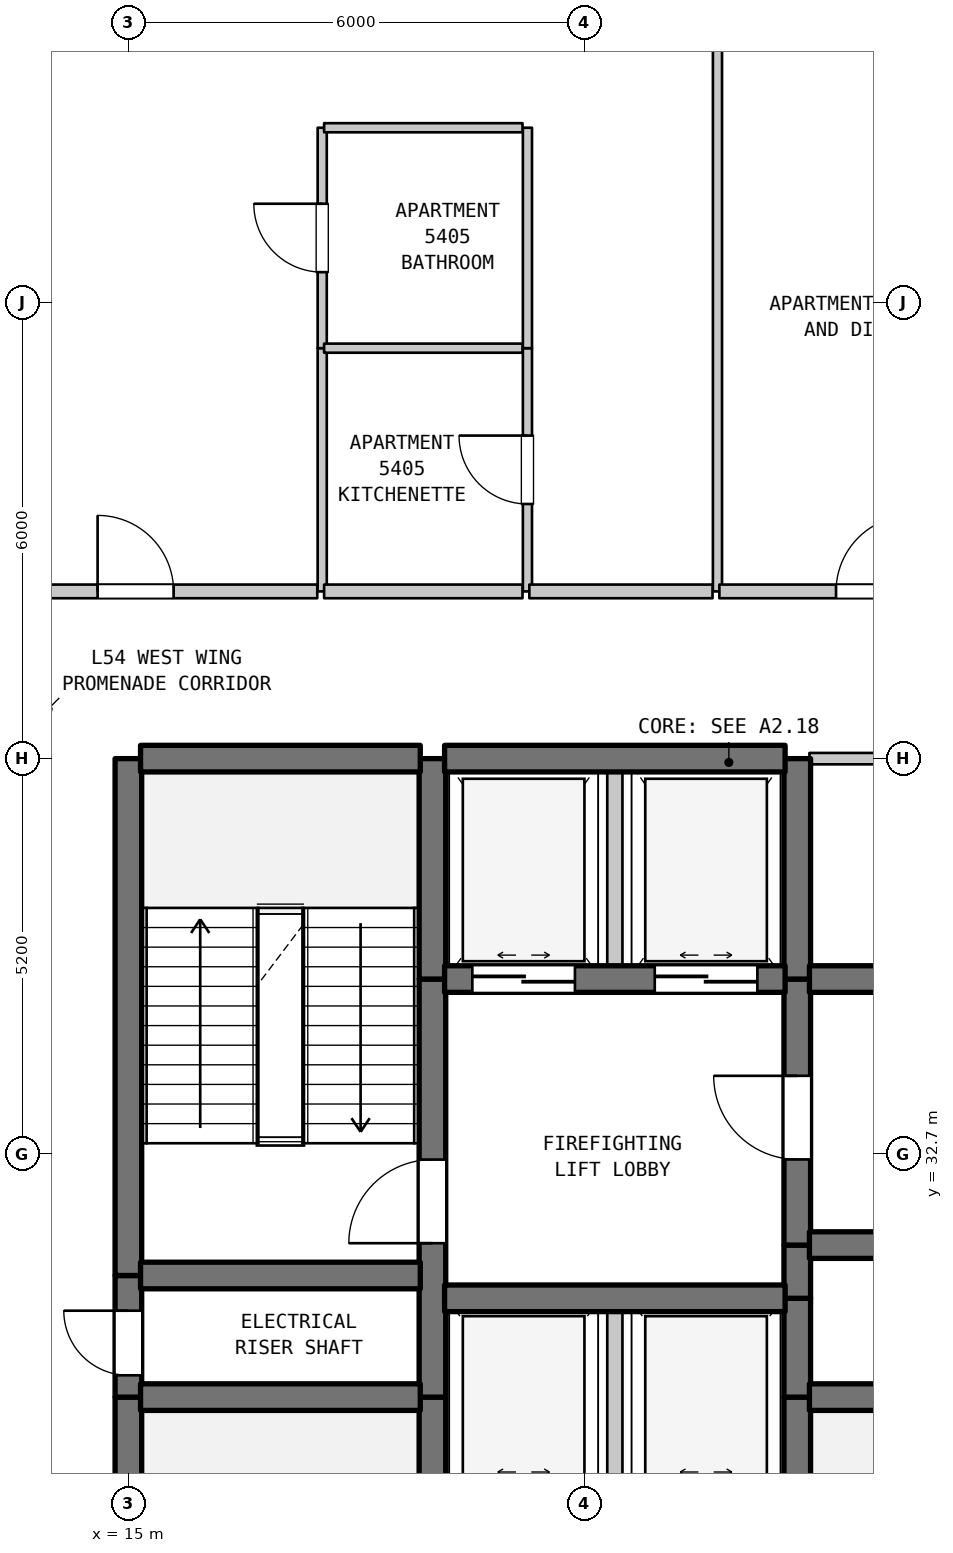
"""IFC4 building model, lengths in metres.
Left out: names, types, materials, properties, quantities, classifications, styles, units other than length and angle.
Written with IfcOpenShell. Run it as: python <this file> out.ifc"""

import sys

from ifc_helpers import new_model, si_unit, direction, frame, frame_2d, origin, place, context, subcontext, project, spatial, rectangle, extrude, element, fill, save


model = new_model("IFC4")
c1 = context("Model", 3, precision=1e-05, world=origin(), true_north=direction((0.0, 1.0)))
c2 = subcontext(c1, "Body", "Model", "MODEL_VIEW")
j1 = project(units=[si_unit("LENGTHUNIT", "METRE"), si_unit("PLANEANGLEUNIT", "RADIAN")], contexts=[c1])
p1 = place(None, origin())
s1 = spatial("IfcSite", under=j1, at=p1, CompositionType="ELEMENT")
p2 = place(p1, origin())
s2 = spatial("IfcBuilding", under=s1, at=p2, CompositionType="ELEMENT")
p3 = place(p2, frame((0.0, 0.0, 218.0)))
s3 = spatial("IfcBuildingStorey", under=s2, at=p3, CompositionType="ELEMENT", Elevation=218.0)
p4 = place(p3, frame((15.0, 22.7, 0.0), z_axis=(0.0, 0.0, 1.0), x_axis=(0.0, 1.0, 0.0)))
e1 = element("IfcWall", 1, at=p4, inside=s3, PredefinedType="SHEAR", context=c2, shape_type="SweptSolid", body=[
    extrude(rectangle(XDim=6.8, YDim=0.35, at=frame_2d((3.4, 0.0))), origin(), (0.0, 0.0, 1.0), 4.49),
])
p5 = place(p3, frame((15.0, 29.5, 0.0), z_axis=(0.0, 0.0, 1.0), x_axis=(0.0, 1.0, 0.0)))
e2 = element("IfcWall", 2, at=p5, inside=s3, PredefinedType="SHEAR", context=c2, shape_type="SweptSolid", body=[
    extrude(rectangle(XDim=1.6, YDim=0.35, at=frame_2d((0.8, 0.0))), origin(), (0.0, 0.0, 1.0), 4.49),
])
p6 = place(p5, frame((0.287, 0.0, 0.0)))
e3 = element("IfcOpeningElement", 3, at=p6, cuts=e2, PredefinedType="OPENING", context=c2, shape_type="SweptSolid", body=[
    extrude(rectangle(XDim=0.85, YDim=2.1, at=frame_2d((0.425, 1.05))), frame((0.0, 0.185, 0.0), z_axis=(0.0, -1.0, 0.0), x_axis=(1.0, 0.0, 0.0)), (0.0, 0.0, 1.0), 0.37),
])
p7 = place(p3, frame((15.0, 31.1, 0.0), z_axis=(0.0, 0.0, 1.0), x_axis=(0.0, 1.0, 0.0)))
e4 = element("IfcWall", 4, at=p7, inside=s3, PredefinedType="SHEAR", context=c2, shape_type="SweptSolid", body=[
    extrude(rectangle(XDim=6.8, YDim=0.35, at=frame_2d((3.4, 0.0))), origin(), (0.0, 0.0, 1.0), 4.49),
])
p8 = place(p3, frame((17.55, 40.1, 0.0), z_axis=(0.0, 0.0, 1.0), x_axis=(0.0, 1.0, 0.0)))
e5 = element("IfcWall", 5, at=p8, inside=s3, PredefinedType="PARTITIONING", context=c2, shape_type="SweptSolid", body=[
    extrude(rectangle(XDim=3.2, YDim=0.12, at=frame_2d((1.6, 0.0))), origin(), (0.0, 0.0, 1.0), 4.49),
])
p9 = place(p3, frame((17.55, 43.3, 0.0), z_axis=(0.0, 0.0, 1.0), x_axis=(0.0, 1.0, 0.0)))
e6 = element("IfcWall", 6, at=p9, inside=s3, PredefinedType="PARTITIONING", context=c2, shape_type="SweptSolid", body=[
    extrude(rectangle(XDim=2.9, YDim=0.12, at=frame_2d((1.45, 0.0))), origin(), (0.0, 0.0, 1.0), 4.49),
])
p10 = place(p9, frame((1.0, 0.0, 0.0)))
e7 = element("IfcOpeningElement", 7, at=p10, cuts=e6, PredefinedType="OPENING", context=c2, shape_type="SweptSolid", body=[
    extrude(rectangle(XDim=0.9, YDim=2.1, at=frame_2d((0.45, 1.05))), frame((0.0, 0.07, 0.0), z_axis=(0.0, -1.0, 0.0), x_axis=(1.0, 0.0, 0.0)), (0.0, 0.0, 1.0), 0.14),
])
p11 = place(p3, frame((19.0, 28.2, 0.0), z_axis=(0.0, 0.0, 1.0), x_axis=(0.0, 1.0, 0.0)))
e8 = element("IfcWall", 8, at=p11, inside=s3, PredefinedType="SHEAR", context=c2, shape_type="SweptSolid", body=[
    extrude(rectangle(XDim=1.3, YDim=0.35, at=frame_2d((0.65, 0.0))), origin(), (0.0, 0.0, 1.0), 4.49),
])
p12 = place(p3, frame((19.0, 29.5, 0.0), z_axis=(0.0, 0.0, 1.0), x_axis=(0.0, 1.0, 0.0)))
e9 = element("IfcWall", 9, at=p12, inside=s3, PredefinedType="SHEAR", context=c2, shape_type="SweptSolid", body=[
    extrude(rectangle(XDim=5.5, YDim=0.35, at=frame_2d((2.75, 0.0))), origin(), (0.0, 0.0, 1.0), 4.49),
])
p13 = place(p12, frame((2.025, 0.0, 0.0)))
e10 = element("IfcOpeningElement", 10, at=p13, cuts=e9, PredefinedType="OPENING", context=c2, shape_type="SweptSolid", body=[
    extrude(rectangle(XDim=1.1, YDim=2.15, at=frame_2d((0.55, 1.075))), frame((0.0, 0.185, 0.0), z_axis=(0.0, -1.0, 0.0), x_axis=(1.0, 0.0, 0.0)), (0.0, 0.0, 1.0), 0.37),
])
p14 = place(p3, frame((19.0, 35.0, 0.0), z_axis=(0.0, 0.0, 1.0), x_axis=(0.0, 1.0, 0.0)))
e11 = element("IfcWall", 11, at=p14, inside=s3, PredefinedType="SHEAR", context=c2, shape_type="SweptSolid", body=[
    extrude(rectangle(XDim=2.9, YDim=0.35, at=frame_2d((1.45, 0.0))), origin(), (0.0, 0.0, 1.0), 4.49),
])
p15 = place(p3, frame((20.25, 40.1, 0.0), z_axis=(0.0, 0.0, 1.0), x_axis=(0.0, 1.0, 0.0)))
e12 = element("IfcWall", 12, at=p15, inside=s3, PredefinedType="PARTITIONING", context=c2, shape_type="SweptSolid", body=[
    extrude(rectangle(XDim=3.2, YDim=0.12, at=frame_2d((1.6, 0.0))), origin(), (0.0, 0.0, 1.0), 4.49),
])
p16 = place(p15, frame((1.15, 0.0, 0.0)))
e13 = element("IfcOpeningElement", 13, at=p16, cuts=e12, PredefinedType="OPENING", context=c2, shape_type="SweptSolid", body=[
    extrude(rectangle(XDim=0.9, YDim=2.15, at=frame_2d((0.45, 1.075))), frame((0.0, 0.07, 0.0), z_axis=(0.0, -1.0, 0.0), x_axis=(1.0, 0.0, 0.0)), (0.0, 0.0, 1.0), 0.14),
])
p17 = place(p3, frame((20.25, 43.3, 0.0), z_axis=(0.0, 0.0, 1.0), x_axis=(0.0, 1.0, 0.0)))
e14 = element("IfcWall", 14, at=p17, inside=s3, PredefinedType="PARTITIONING", context=c2, shape_type="SweptSolid", body=[
    extrude(rectangle(XDim=2.9, YDim=0.12, at=frame_2d((1.45, 0.0))), origin(), (0.0, 0.0, 1.0), 4.49),
])
p18 = place(p3, frame((21.4, 28.2, 0.0), z_axis=(0.0, 0.0, 1.0), x_axis=(0.0, 1.0, 0.0)))
e15 = element("IfcWall", 15, at=p18, inside=s3, PredefinedType="STANDARD", context=c2, shape_type="SweptSolid", body=[
    extrude(rectangle(XDim=2.6, YDim=0.2, at=frame_2d((1.3, 0.0))), origin(), (0.0, 0.0, 1.0), 4.49),
])
p19 = place(p3, frame((21.4, 35.0, 0.0), z_axis=(0.0, 0.0, 1.0), x_axis=(0.0, 1.0, 0.0)))
e16 = element("IfcWall", 16, at=p19, inside=s3, PredefinedType="STANDARD", context=c2, shape_type="SweptSolid", body=[
    extrude(rectangle(XDim=2.9, YDim=0.2, at=frame_2d((1.45, 0.0))), origin(), (0.0, 0.0, 1.0), 4.49),
])
p20 = place(p3, frame((22.75, 40.1, 0.0), z_axis=(0.0, 0.0, 1.0), x_axis=(0.0, 1.0, 0.0)))
e17 = element("IfcWall", 17, at=p20, inside=s3, PredefinedType="PARTITIONING", context=c2, shape_type="SweptSolid", body=[
    extrude(rectangle(XDim=13.79, YDim=0.12, at=frame_2d((6.895, 0.0))), origin(), (0.0, 0.0, 1.0), 4.49),
])
for number, where, z_axis, x_axis in (
    (18, (23.8, 28.2, 0.0), (0.0, 0.0, 1.0), (0.0, 1.0, 0.0)),
    (19, (23.8, 29.5, 0.0), (0.0, 0.0, 1.0), (0.0, 1.0, 0.0)),
):
    element("IfcWall", number, at=place(p3, frame(where, z_axis=z_axis, x_axis=x_axis)), inside=s3, PredefinedType="SHEAR", context=c2, shape_type="SweptSolid", body=[
        extrude(rectangle(XDim=1.3, YDim=0.35, at=frame_2d((0.65, 0.0))), origin(), (0.0, 0.0, 1.0), 4.49),
    ])
p21 = place(p3, frame((23.8, 30.8, 0.0), z_axis=(0.0, 0.0, 1.0), x_axis=(0.0, 1.0, 0.0)))
e20 = element("IfcWall", 20, at=p21, inside=s3, PredefinedType="SHEAR", context=c2, shape_type="SweptSolid", body=[
    extrude(rectangle(XDim=0.7, YDim=0.35, at=frame_2d((0.35, 0.0))), origin(), (0.0, 0.0, 1.0), 4.49),
])
p22 = place(p3, frame((23.8, 31.5, 0.0), z_axis=(0.0, 0.0, 1.0), x_axis=(0.0, 1.0, 0.0)))
e21 = element("IfcWall", 21, at=p22, inside=s3, PredefinedType="SHEAR", context=c2, shape_type="SweptSolid", body=[
    extrude(rectangle(XDim=3.5, YDim=0.35, at=frame_2d((1.75, 0.0))), origin(), (0.0, 0.0, 1.0), 4.49),
])
p23 = place(p22, frame((1.127, 0.0, 0.0)))
e22 = element("IfcOpeningElement", 22, at=p23, cuts=e21, PredefinedType="OPENING", context=c2, shape_type="SweptSolid", body=[
    extrude(rectangle(XDim=1.1, YDim=2.15, at=frame_2d((0.55, 1.075))), frame((0.0, 0.185, 0.0), z_axis=(0.0, -1.0, 0.0), x_axis=(1.0, 0.0, 0.0)), (0.0, 0.0, 1.0), 0.37),
])
p24 = place(p3, frame((23.8, 35.0, 0.0), z_axis=(0.0, 0.0, 1.0), x_axis=(0.0, 1.0, 0.0)))
e23 = element("IfcWall", 23, at=p24, inside=s3, PredefinedType="SHEAR", context=c2, shape_type="SweptSolid", body=[
    extrude(rectangle(XDim=2.9, YDim=0.35, at=frame_2d((1.45, 0.0))), origin(), (0.0, 0.0, 1.0), 4.49),
])
p25 = place(p3, frame((15.16, 29.5, 0.0), z_axis=(0.0, 0.0, 1.0), x_axis=(1.0, 0.0, 0.0)))
e24 = element("IfcWall", 24, at=p25, inside=s3, PredefinedType="SHEAR", context=c2, shape_type="SweptSolid", body=[
    extrude(rectangle(XDim=3.68, YDim=0.35, at=frame_2d((1.84, 0.0))), origin(), (0.0, 0.0, 1.0), 4.49),
])
p26 = place(p3, frame((23.96, 29.5, 0.0), z_axis=(0.0, 0.0, 1.0), x_axis=(1.0, 0.0, 0.0)))
e25 = element("IfcWall", 25, at=p26, inside=s3, PredefinedType="SHEAR", context=c2, shape_type="SweptSolid", body=[
    extrude(rectangle(XDim=3.18, YDim=0.35, at=frame_2d((1.59, 0.0))), origin(), (0.0, 0.0, 1.0), 4.49),
])
p27 = place(p3, frame((19.16, 30.8, 0.0), z_axis=(0.0, 0.0, 1.0), x_axis=(1.0, 0.0, 0.0)))
e26 = element("IfcWall", 26, at=p27, inside=s3, PredefinedType="SHEAR", context=c2, shape_type="SweptSolid", body=[
    extrude(rectangle(XDim=4.48, YDim=0.35, at=frame_2d((2.24, 0.0))), origin(), (0.0, 0.0, 1.0), 4.49),
])
p28 = place(p3, frame((15.16, 31.1, 0.0), z_axis=(0.0, 0.0, 1.0), x_axis=(1.0, 0.0, 0.0)))
e27 = element("IfcWall", 27, at=p28, inside=s3, PredefinedType="SHEAR", context=c2, shape_type="SweptSolid", body=[
    extrude(rectangle(XDim=3.68, YDim=0.35, at=frame_2d((1.84, 0.0))), origin(), (0.0, 0.0, 1.0), 4.49),
])
p29 = place(p3, frame((23.96, 31.5, 0.0), z_axis=(0.0, 0.0, 1.0), x_axis=(1.0, 0.0, 0.0)))
e28 = element("IfcWall", 28, at=p29, inside=s3, PredefinedType="SHEAR", context=c2, shape_type="SweptSolid", body=[
    extrude(rectangle(XDim=3.18, YDim=0.35, at=frame_2d((1.59, 0.0))), origin(), (0.0, 0.0, 1.0), 4.49),
])
p30 = place(p29, frame((1.094, 0.0, 0.0)))
e29 = element("IfcOpeningElement", 29, at=p30, cuts=e28, PredefinedType="OPENING", context=c2, shape_type="SweptSolid", body=[
    extrude(rectangle(XDim=0.85, YDim=2.1, at=frame_2d((0.425, 1.05))), frame((0.0, 0.185, 0.0), z_axis=(0.0, -1.0, 0.0), x_axis=(1.0, 0.0, 0.0)), (0.0, 0.0, 1.0), 0.37),
])
p31 = place(p3, frame((19.16, 35.0, 0.0), z_axis=(0.0, 0.0, 1.0), x_axis=(1.0, 0.0, 0.0)))
e30 = element("IfcWall", 30, at=p31, inside=s3, PredefinedType="SHEAR", context=c2, shape_type="SweptSolid", body=[
    extrude(rectangle(XDim=4.48, YDim=0.35, at=frame_2d((2.24, 0.0))), origin(), (0.0, 0.0, 1.0), 4.49),
])
p32 = place(p31, frame((0.365, 0.0, 0.0)))
e31 = element("IfcOpeningElement", 31, at=p32, cuts=e30, PredefinedType="OPENING", context=c2, shape_type="SweptSolid", body=[
    extrude(rectangle(XDim=1.35, YDim=2.2, at=frame_2d((0.675, 1.1))), frame((0.0, 0.185, 0.0), z_axis=(0.0, -1.0, 0.0), x_axis=(1.0, 0.0, 0.0)), (0.0, 0.0, 1.0), 0.37),
])
p33 = place(p31, frame((2.765, 0.0, 0.0)))
e32 = element("IfcOpeningElement", 32, at=p33, cuts=e30, PredefinedType="OPENING", context=c2, shape_type="SweptSolid", body=[
    extrude(rectangle(XDim=1.35, YDim=2.2, at=frame_2d((0.675, 1.1))), frame((0.0, 0.185, 0.0), z_axis=(0.0, -1.0, 0.0), x_axis=(1.0, 0.0, 0.0)), (0.0, 0.0, 1.0), 0.37),
])
p34 = place(p3, frame((23.96, 35.0, 0.0), z_axis=(0.0, 0.0, 1.0), x_axis=(1.0, 0.0, 0.0)))
e33 = element("IfcWall", 33, at=p34, inside=s3, PredefinedType="SHEAR", context=c2, shape_type="SweptSolid", body=[
    extrude(rectangle(XDim=3.995, YDim=0.35, at=frame_2d((1.998, 0.0))), origin(), (0.0, 0.0, 1.0), 4.49),
])
p35 = place(p34, frame((1.393, 0.0, 0.0)))
e34 = element("IfcOpeningElement", 34, at=p35, cuts=e33, PredefinedType="OPENING", context=c2, shape_type="SweptSolid", body=[
    extrude(rectangle(XDim=0.95, YDim=2.15, at=frame_2d((0.475, 1.075))), frame((0.0, 0.185, 0.0), z_axis=(0.0, -1.0, 0.0), x_axis=(1.0, 0.0, 0.0)), (0.0, 0.0, 1.0), 0.37),
])
p36 = place(p3, frame((15.16, 37.9, 0.0), z_axis=(0.0, 0.0, 1.0), x_axis=(1.0, 0.0, 0.0)))
e35 = element("IfcWall", 35, at=p36, inside=s3, PredefinedType="SHEAR", context=c2, shape_type="SweptSolid", body=[
    extrude(rectangle(XDim=3.68, YDim=0.35, at=frame_2d((1.84, 0.0))), origin(), (0.0, 0.0, 1.0), 4.49),
])
p37 = place(p3, frame((19.16, 37.9, 0.0), z_axis=(0.0, 0.0, 1.0), x_axis=(1.0, 0.0, 0.0)))
e36 = element("IfcWall", 36, at=p37, inside=s3, PredefinedType="SHEAR", context=c2, shape_type="SweptSolid", body=[
    extrude(rectangle(XDim=4.48, YDim=0.35, at=frame_2d((2.24, 0.0))), origin(), (0.0, 0.0, 1.0), 4.49),
])
p38 = place(p3, frame((23.96, 37.9, 0.0), z_axis=(0.0, 0.0, 1.0), x_axis=(1.0, 0.0, 0.0)))
e37 = element("IfcWall", 37, at=p38, inside=s3, PredefinedType="STANDARD", context=c2, shape_type="SweptSolid", body=[
    extrude(rectangle(XDim=3.995, YDim=0.15, at=frame_2d((1.998, 0.0))), origin(), (0.0, 0.0, 1.0), 3.99),
])
p39 = place(p3, frame((12.875, 40.1, 0.0), z_axis=(0.0, 0.0, 1.0), x_axis=(1.0, 0.0, 0.0)))
e38 = element("IfcWall", 38, at=p39, inside=s3, PredefinedType="STANDARD", context=c2, shape_type="SweptSolid", body=[
    extrude(rectangle(XDim=4.61, YDim=0.18, at=frame_2d((2.305, 0.0))), origin(), (0.0, 0.0, 1.0), 4.49),
])
p40 = place(p39, frame((1.72, 0.0, 0.0)))
e39 = element("IfcOpeningElement", 39, at=p40, cuts=e38, PredefinedType="OPENING", context=c2, shape_type="SweptSolid", body=[
    extrude(rectangle(XDim=1.0, YDim=2.15, at=frame_2d((0.5, 1.075))), frame((0.0, 0.1, 0.0), z_axis=(0.0, -1.0, 0.0), x_axis=(1.0, 0.0, 0.0)), (0.0, 0.0, 1.0), 0.2),
])
p41 = place(p3, frame((17.575, 40.1, 0.0), z_axis=(0.0, 0.0, 1.0), x_axis=(1.0, 0.0, 0.0)))
e40 = element("IfcWall", 40, at=p41, inside=s3, PredefinedType="STANDARD", context=c2, shape_type="SweptSolid", body=[
    extrude(rectangle(XDim=2.61, YDim=0.18, at=frame_2d((1.305, 0.0))), origin(), (0.0, 0.0, 1.0), 4.49),
])
p42 = place(p3, frame((20.275, 40.1, 0.0), z_axis=(0.0, 0.0, 1.0), x_axis=(1.0, 0.0, 0.0)))
e41 = element("IfcWall", 41, at=p42, inside=s3, PredefinedType="STANDARD", context=c2, shape_type="SweptSolid", body=[
    extrude(rectangle(XDim=2.41, YDim=0.18, at=frame_2d((1.205, 0.0))), origin(), (0.0, 0.0, 1.0), 4.49),
])
p43 = place(p3, frame((22.775, 40.1, 0.0), z_axis=(0.0, 0.0, 1.0), x_axis=(1.0, 0.0, 0.0)))
e42 = element("IfcWall", 42, at=p43, inside=s3, PredefinedType="STANDARD", context=c2, shape_type="SweptSolid", body=[
    extrude(rectangle(XDim=4.07, YDim=0.18, at=frame_2d((2.035, 0.0))), origin(), (0.0, 0.0, 1.0), 4.49),
])
p44 = place(p43, frame((1.535, 0.0, 0.0)))
e43 = element("IfcOpeningElement", 43, at=p44, cuts=e42, PredefinedType="OPENING", context=c2, shape_type="SweptSolid", body=[
    extrude(rectangle(XDim=1.0, YDim=2.15, at=frame_2d((0.5, 1.075))), frame((0.0, 0.1, 0.0), z_axis=(0.0, -1.0, 0.0), x_axis=(1.0, 0.0, 0.0)), (0.0, 0.0, 1.0), 0.2),
])
for number, where, z_axis, x_axis in (
    (44, (17.575, 43.3, 0.0), (0.0, 0.0, 1.0), (1.0, 0.0, 0.0)),
    (45, (17.575, 46.2, 0.0), (0.0, 0.0, 1.0), (1.0, 0.0, 0.0)),
):
    element("IfcWall", number, at=place(p3, frame(where, z_axis=z_axis, x_axis=x_axis)), inside=s3, PredefinedType="PARTITIONING", context=c2, shape_type="SweptSolid", body=[
        extrude(rectangle(XDim=2.61, YDim=0.12, at=frame_2d((1.305, 0.0))), origin(), (0.0, 0.0, 1.0), 4.49),
    ])
p45 = place(p6, origin())
e46 = element("IfcDoor", 46, at=p45, inside=s3, OperationType="SINGLE_SWING_RIGHT", PredefinedType="DOOR", context=c2, shape_type="SweptSolid", body=[
    extrude(rectangle(XDim=0.85, YDim=2.1, at=frame_2d((0.425, 1.05))), frame((0.0, 0.025, 0.0), z_axis=(0.0, -1.0, 0.0), x_axis=(1.0, 0.0, 0.0)), (0.0, 0.0, 1.0), 0.05),
])
fill(e3, e46)
p46 = place(p10, origin())
e47 = element("IfcDoor", 47, at=p46, inside=s3, OperationType="SINGLE_SWING_RIGHT", PredefinedType="DOOR", context=c2, shape_type="SweptSolid", body=[
    extrude(rectangle(XDim=0.9, YDim=2.1, at=frame_2d((0.45, 1.05))), frame((0.0, 0.025, 0.0), z_axis=(0.0, -1.0, 0.0), x_axis=(1.0, 0.0, 0.0)), (0.0, 0.0, 1.0), 0.05),
])
fill(e7, e47)
p47 = place(p13, origin())
e48 = element("IfcDoor", 48, at=p47, inside=s3, OperationType="SINGLE_SWING_LEFT", PredefinedType="DOOR", context=c2, shape_type="SweptSolid", body=[
    extrude(rectangle(XDim=1.1, YDim=2.15, at=frame_2d((0.55, 1.075))), frame((0.0, 0.025, 0.0), z_axis=(0.0, -1.0, 0.0), x_axis=(1.0, 0.0, 0.0)), (0.0, 0.0, 1.0), 0.05),
])
fill(e10, e48)
p48 = place(p16, origin())
e49 = element("IfcDoor", 49, at=p48, inside=s3, OperationType="SINGLE_SWING_RIGHT", PredefinedType="DOOR", context=c2, shape_type="SweptSolid", body=[
    extrude(rectangle(XDim=0.9, YDim=2.15, at=frame_2d((0.45, 1.075))), frame((0.0, 0.025, 0.0), z_axis=(0.0, -1.0, 0.0), x_axis=(1.0, 0.0, 0.0)), (0.0, 0.0, 1.0), 0.05),
])
fill(e13, e49)
p49 = place(p23, origin())
e50 = element("IfcDoor", 50, at=p49, inside=s3, OperationType="SINGLE_SWING_RIGHT", PredefinedType="DOOR", context=c2, shape_type="SweptSolid", body=[
    extrude(rectangle(XDim=1.1, YDim=2.15, at=frame_2d((0.55, 1.075))), frame((0.0, 0.025, 0.0), z_axis=(0.0, -1.0, 0.0), x_axis=(1.0, 0.0, 0.0)), (0.0, 0.0, 1.0), 0.05),
])
fill(e22, e50)
p50 = place(p32, origin())
e51 = element("IfcDoor", 51, at=p50, inside=s3, OperationType="DOUBLE_DOOR_SLIDING", PredefinedType="DOOR", context=c2, shape_type="SweptSolid", body=[
    extrude(rectangle(XDim=1.35, YDim=2.2, at=frame_2d((0.675, 1.1))), frame((0.0, 0.025, 0.0), z_axis=(0.0, -1.0, 0.0), x_axis=(1.0, 0.0, 0.0)), (0.0, 0.0, 1.0), 0.05),
])
fill(e31, e51)
p51 = place(p33, origin())
e52 = element("IfcDoor", 52, at=p51, inside=s3, OperationType="DOUBLE_DOOR_SLIDING", PredefinedType="DOOR", context=c2, shape_type="SweptSolid", body=[
    extrude(rectangle(XDim=1.35, YDim=2.2, at=frame_2d((0.675, 1.1))), frame((0.0, 0.025, 0.0), z_axis=(0.0, -1.0, 0.0), x_axis=(1.0, 0.0, 0.0)), (0.0, 0.0, 1.0), 0.05),
])
fill(e32, e52)
p52 = place(p40, origin())
e53 = element("IfcDoor", 53, at=p52, inside=s3, OperationType="SINGLE_SWING_LEFT", PredefinedType="DOOR", context=c2, shape_type="SweptSolid", body=[
    extrude(rectangle(XDim=1.0, YDim=2.15, at=frame_2d((0.5, 1.075))), frame((0.0, 0.025, 0.0), z_axis=(0.0, -1.0, 0.0), x_axis=(1.0, 0.0, 0.0)), (0.0, 0.0, 1.0), 0.05),
])
fill(e39, e53)
p53 = place(p44, origin())
e54 = element("IfcDoor", 54, at=p53, inside=s3, OperationType="SINGLE_SWING_RIGHT", PredefinedType="DOOR", context=c2, shape_type="SweptSolid", body=[
    extrude(rectangle(XDim=1.0, YDim=2.15, at=frame_2d((0.5, 1.075))), frame((0.0, 0.025, 0.0), z_axis=(0.0, -1.0, 0.0), x_axis=(1.0, 0.0, 0.0)), (0.0, 0.0, 1.0), 0.05),
])
fill(e43, e54)
save(model, sys.argv[1])
